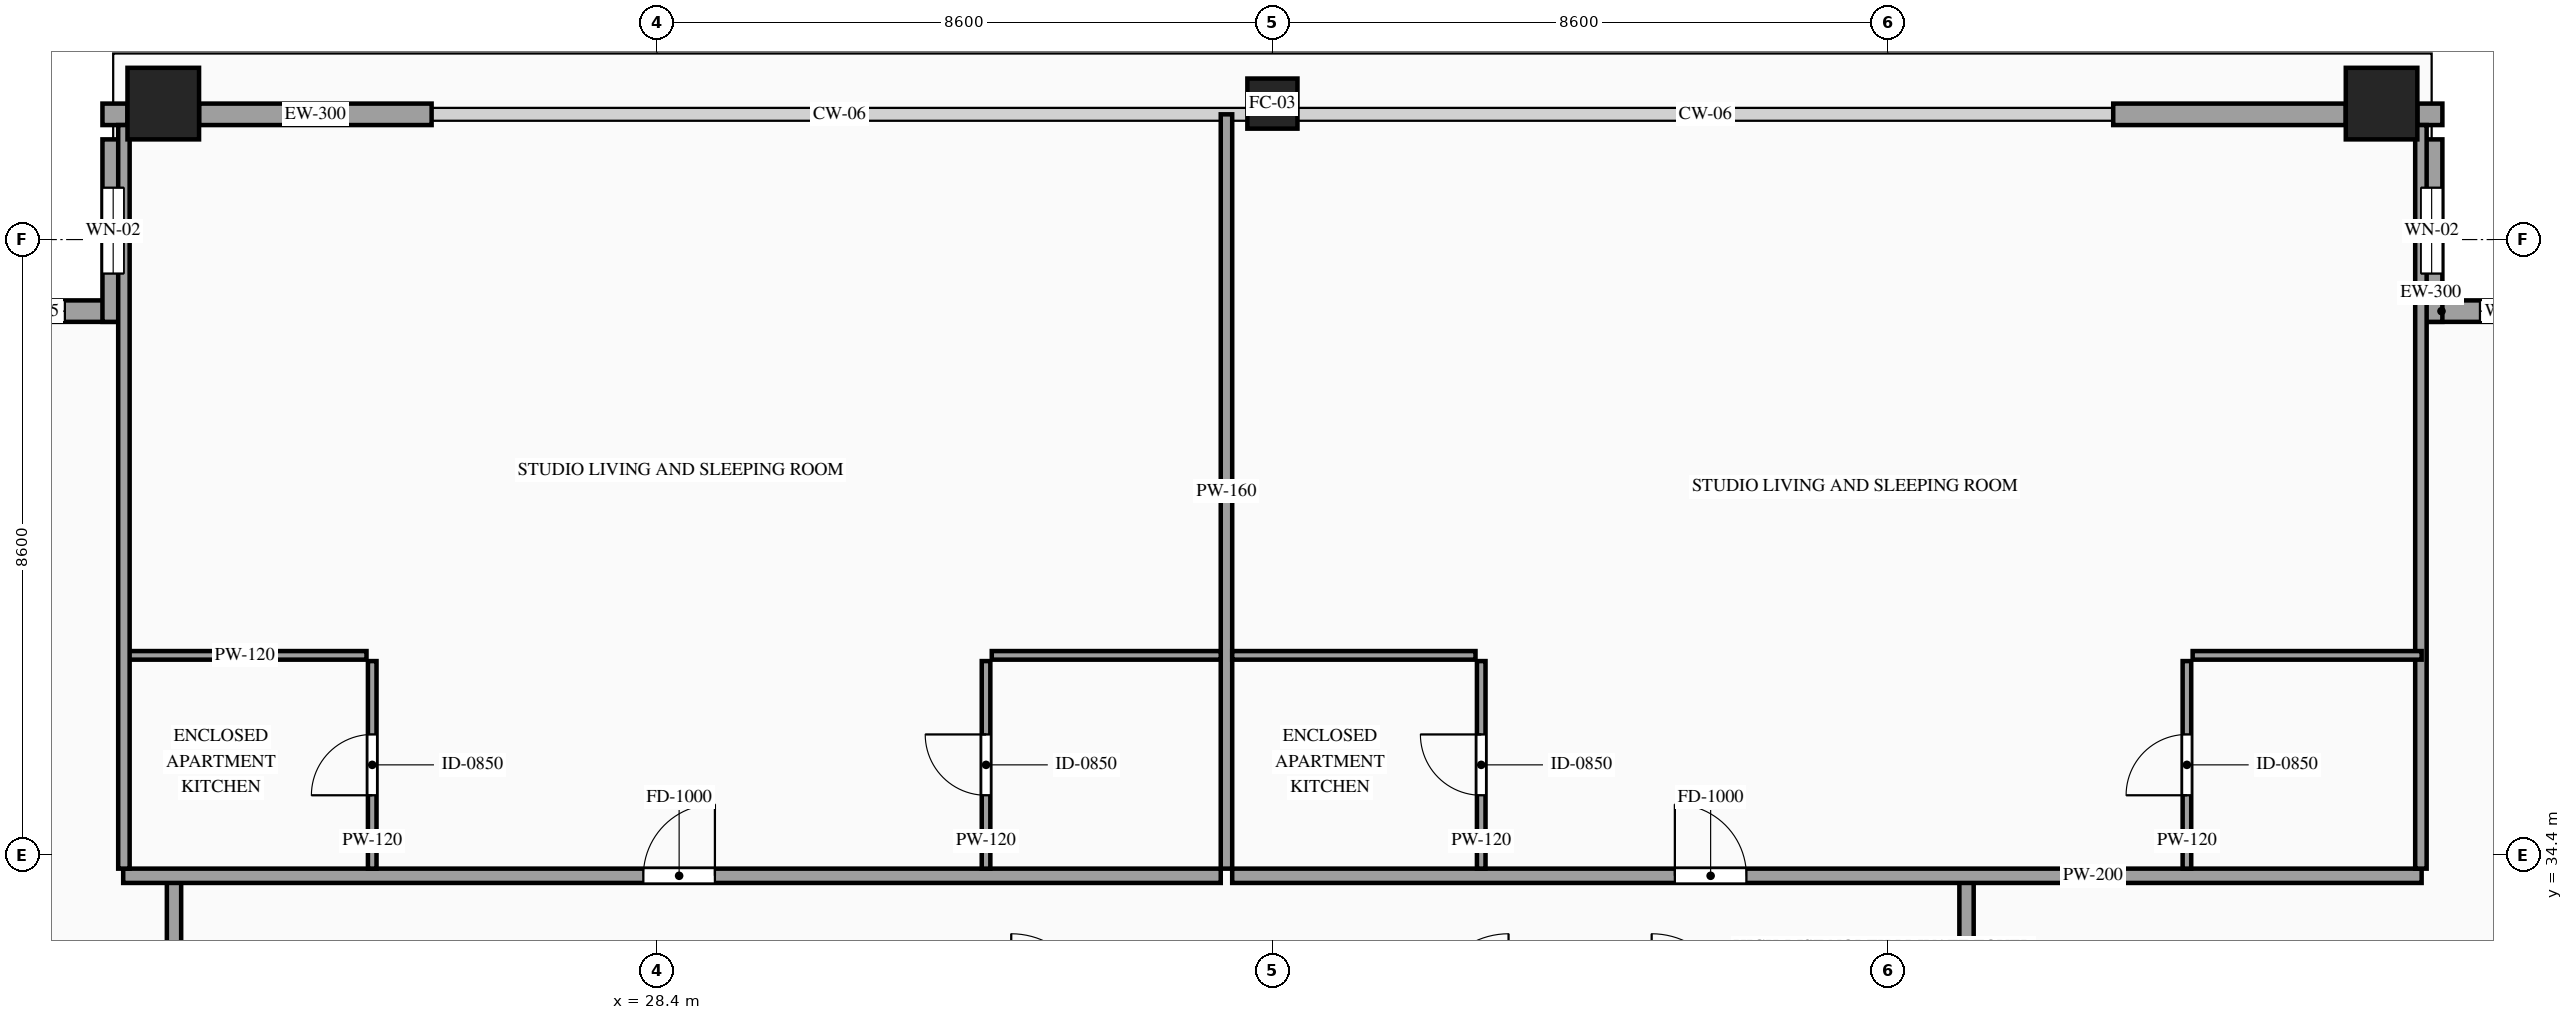
"""IFC4 building model, lengths in metres.
Left out: names, types, materials, properties, quantities, classifications, styles, units other than length and angle.
Written with IfcOpenShell. Run it as: python <this file> out.ifc"""

import sys

from ifc_helpers import new_model, si_unit, direction, frame, frame_2d, origin, origin_2d, place, context, subcontext, project, spatial, rectangle, hollow_rectangle, extrude, source, transform, mapped, element, fill, save


model = new_model("IFC4")
c1 = context("Model", 3, precision=1e-05, world=origin(), true_north=direction((0.0, 1.0)))
c2 = subcontext(c1, "Body", "Model", "MODEL_VIEW")
j1 = project(units=[si_unit("LENGTHUNIT", "METRE"), si_unit("PLANEANGLEUNIT", "RADIAN")], contexts=[c1])
p1 = place(None, origin())
s1 = spatial("IfcSite", under=j1, at=p1, CompositionType="ELEMENT")
p2 = place(p1, origin())
s2 = spatial("IfcBuilding", under=s1, at=p2, CompositionType="ELEMENT")
p3 = place(p2, frame((0.0, 0.0, 321.7)))
s3 = spatial("IfcBuildingStorey", under=s2, at=p3, CompositionType="ELEMENT", Elevation=321.7)
m1 = source(origin(), c2, "Body", "SweptSolid", [
    extrude(hollow_rectangle(XDim=1.0, YDim=1.0, WallThickness=0.048, at=origin_2d()), origin(), (0.0, 0.0, 1.0), 3.5),
])
p4 = place(p3, frame((21.5, 44.9, 0.0), z_axis=(0.0, 0.0, 1.0), x_axis=(1.0, 0.0, 0.0)))
e1 = element("IfcColumn", 1, at=p4, inside=s3, PredefinedType="COLUMN", context=c2, shape_type="MappedRepresentation", body=[
    mapped(m1, transform((0.0, 0.0, 0.0), scale=1.0)),
])
m2 = source(origin(), c2, "Body", "SweptSolid", [
    extrude(hollow_rectangle(XDim=0.7, YDim=0.7, WallThickness=0.032, at=origin_2d()), origin(), (0.0, 0.0, 1.0), 3.5),
])
p5 = place(p3, frame((37.0, 44.9, 0.0), z_axis=(0.0, 0.0, 1.0), x_axis=(1.0, 0.0, 0.0)))
e2 = element("IfcColumn", 2, at=p5, inside=s3, PredefinedType="COLUMN", context=c2, shape_type="MappedRepresentation", body=[
    mapped(m2, transform((0.0, 0.0, 0.0), scale=1.0)),
])
p6 = place(p3, frame((52.5, 44.9, 0.0), z_axis=(0.0, 0.0, 1.0), x_axis=(1.0, 0.0, 0.0)))
e3 = element("IfcColumn", 3, at=p6, inside=s3, PredefinedType="COLUMN", context=c2, shape_type="MappedRepresentation", body=[
    mapped(m1, transform((0.0, 0.0, 0.0), scale=1.0)),
])
p7 = place(p3, frame((20.95, 42.0, 0.0), z_axis=(0.0, 0.0, 1.0), x_axis=(-1.0, 0.0, 0.0)))
e4 = element("IfcWall", 4, at=p7, inside=s3, PredefinedType="SOLIDWALL", context=c2, shape_type="SweptSolid", body=[
    extrude(rectangle(XDim=2.55, YDim=0.3, at=frame_2d((1.275, 0.0))), origin(), (0.0, 0.0, 1.0), 3.28),
])
p8 = place(p7, frame((0.825, 0.0, 0.85)))
e5 = element("IfcOpeningElement", 5, at=p8, cuts=e4, PredefinedType="OPENING", context=c2, shape_type="SweptSolid", body=[
    extrude(rectangle(XDim=0.9, YDim=1.5, at=frame_2d((0.45, 0.75))), frame((0.0, 0.165, 0.0), z_axis=(0.0, -1.0, 0.0), x_axis=(1.0, 0.0, 0.0)), (0.0, 0.0, 1.0), 0.33),
])
p9 = place(p3, frame((20.8, 44.4, 0.0), z_axis=(0.0, 0.0, 1.0), x_axis=(0.0, -1.0, 0.0)))
e6 = element("IfcWall", 6, at=p9, inside=s3, PredefinedType="SOLIDWALL", context=c2, shape_type="SweptSolid", body=[
    extrude(rectangle(XDim=2.55, YDim=0.3, at=frame_2d((1.275, 0.0))), origin(), (0.0, 0.0, 1.0), 3.28),
])
p10 = place(p9, frame((0.675, 0.0, 0.85)))
e7 = element("IfcOpeningElement", 7, at=p10, cuts=e6, PredefinedType="OPENING", context=c2, shape_type="SweptSolid", body=[
    extrude(rectangle(XDim=1.2, YDim=2.1, at=frame_2d((0.6, 1.05))), frame((0.0, 0.165, 0.0), z_axis=(0.0, -1.0, 0.0), x_axis=(1.0, 0.0, 0.0)), (0.0, 0.0, 1.0), 0.33),
])
p11 = place(p3, frame((55.6, 42.0, 0.0), z_axis=(0.0, 0.0, 1.0), x_axis=(-1.0, 0.0, 0.0)))
e8 = element("IfcWall", 8, at=p11, inside=s3, PredefinedType="SOLIDWALL", context=c2, shape_type="SweptSolid", body=[
    extrude(rectangle(XDim=2.55, YDim=0.3, at=frame_2d((1.275, 0.0))), origin(), (0.0, 0.0, 1.0), 3.28),
])
p12 = place(p11, frame((0.825, 0.0, 0.85)))
e9 = element("IfcOpeningElement", 9, at=p12, cuts=e8, PredefinedType="OPENING", context=c2, shape_type="SweptSolid", body=[
    extrude(rectangle(XDim=0.9, YDim=1.5, at=frame_2d((0.45, 0.75))), frame((0.0, 0.165, 0.0), z_axis=(0.0, -1.0, 0.0), x_axis=(1.0, 0.0, 0.0)), (0.0, 0.0, 1.0), 0.33),
])
p13 = place(p3, frame((53.2, 41.85, 0.0), z_axis=(0.0, 0.0, 1.0), x_axis=(0.0, 1.0, 0.0)))
e10 = element("IfcWall", 10, at=p13, inside=s3, PredefinedType="SOLIDWALL", context=c2, shape_type="SweptSolid", body=[
    extrude(rectangle(XDim=2.55, YDim=0.3, at=frame_2d((1.275, 0.0))), origin(), (0.0, 0.0, 1.0), 3.28),
])
p14 = place(p13, frame((0.675, 0.0, 0.85)))
e11 = element("IfcOpeningElement", 11, at=p14, cuts=e10, PredefinedType="OPENING", context=c2, shape_type="SweptSolid", body=[
    extrude(rectangle(XDim=1.2, YDim=2.1, at=frame_2d((0.6, 1.05))), frame((0.0, 0.165, 0.0), z_axis=(0.0, -1.0, 0.0), x_axis=(1.0, 0.0, 0.0)), (0.0, 0.0, 1.0), 0.33),
])
m3 = source(origin(), c2, "Body", "SweptSolid", [
    extrude(rectangle(XDim=0.35, YDim=0.3, at=frame_2d((0.175, 0.0))), origin(), (0.0, 0.0, 1.0), 3.28),
])
for number, where, z_axis, x_axis in (
    (12, (20.65, 44.75, 0.0), (0.0, 0.0, 1.0), (1.0, 0.0, 0.0)),
    (13, (53.0, 44.75, 0.0), (0.0, 0.0, 1.0), (1.0, 0.0, 0.0)),
):
    element("IfcWall", number, at=place(p3, frame(where, z_axis=z_axis, x_axis=x_axis)), inside=s3, PredefinedType="SOLIDWALL", context=c2, shape_type="MappedRepresentation", body=[
        mapped(m3, transform((0.0, 0.0, 0.0), scale=1.0)),
    ])
m4 = source(origin(), c2, "Body", "SweptSolid", [
    extrude(rectangle(XDim=3.25, YDim=0.3, at=frame_2d((1.625, 0.0))), origin(), (0.0, 0.0, 1.0), 2.885),
])
for number, where, z_axis, x_axis in (
    (14, (22.0, 44.75, 0.0), (0.0, 0.0, 1.0), (1.0, 0.0, 0.0)),
    (15, (48.75, 44.75, 0.0), (0.0, 0.0, 1.0), (1.0, 0.0, 0.0)),
):
    element("IfcWall", number, at=place(p3, frame(where, z_axis=z_axis, x_axis=x_axis)), inside=s3, PredefinedType="SOLIDWALL", context=c2, shape_type="MappedRepresentation", body=[
        mapped(m4, transform((0.0, 0.0, 0.0), scale=1.0)),
    ])
m5 = source(origin(), c2, "Body", "SweptSolid", [
    extrude(rectangle(XDim=1.7, YDim=0.2, at=frame_2d((0.85, 0.0))), origin(), (0.0, 0.0, 1.0), 3.28),
])
for number, where, z_axis, x_axis in (
    (16, (21.65, 32.35, 0.0), (0.0, 0.0, 1.0), (0.0, 1.0, 0.0)),
    (17, (46.7, 32.35, 0.0), (0.0, 0.0, 1.0), (0.0, 1.0, 0.0)),
):
    element("IfcWall", number, at=place(p3, frame(where, z_axis=z_axis, x_axis=x_axis)), inside=s3, PredefinedType="PARTITIONING", context=c2, shape_type="MappedRepresentation", body=[
        mapped(m5, transform((0.0, 0.0, 0.0), scale=1.0)),
    ])
p15 = place(p3, frame((20.94, 34.11, 0.0), z_axis=(0.0, 0.0, 1.0), x_axis=(1.0, 0.0, 0.0)))
e18 = element("IfcWall", 18, at=p15, inside=s3, PredefinedType="PARTITIONING", context=c2, shape_type="SweptSolid", body=[
    extrude(rectangle(XDim=15.338, YDim=0.2, at=frame_2d((7.669, 0.0))), origin(), (0.0, 0.0, 1.0), 3.28),
])
p16 = place(p15, frame((7.269, 0.0, 0.0)))
e19 = element("IfcOpeningElement", 19, at=p16, cuts=e18, PredefinedType="OPENING", context=c2, shape_type="SweptSolid", body=[
    extrude(rectangle(XDim=1.0, YDim=2.2, at=frame_2d((0.5, 1.1))), frame((0.0, 0.115, 0.0), z_axis=(0.0, -1.0, 0.0), x_axis=(1.0, 0.0, 0.0)), (0.0, 0.0, 1.0), 0.23),
])
m6 = source(origin(), c2, "Body", "SweptSolid", [
    extrude(rectangle(XDim=10.54, YDim=0.16, at=frame_2d((5.27, 0.0))), origin(), (0.0, 0.0, 1.0), 3.28),
])
p17 = place(p3, frame((36.358, 34.21, 0.0), z_axis=(0.0, 0.0, 1.0), x_axis=(0.0, 1.0, 0.0)))
e20 = element("IfcWall", 20, at=p17, inside=s3, PredefinedType="PARTITIONING", context=c2, shape_type="MappedRepresentation", body=[
    mapped(m6, transform((0.0, 0.0, 0.0), scale=1.0)),
])
m7 = source(origin(), c2, "Body", "SweptSolid", [
    extrude(rectangle(XDim=3.4, YDim=0.12, at=frame_2d((1.7, 0.0))), origin(), (0.0, 0.0, 1.0), 3.28),
])
p18 = place(p3, frame((20.94, 37.19, 0.0), z_axis=(0.0, 0.0, 1.0), x_axis=(1.0, 0.0, 0.0)))
e21 = element("IfcWall", 21, at=p18, inside=s3, PredefinedType="PARTITIONING", context=c2, shape_type="MappedRepresentation", body=[
    mapped(m7, transform((0.0, 0.0, 0.0), scale=1.0)),
])
p19 = place(p3, frame((24.42, 34.21, 0.0), z_axis=(0.0, 0.0, 1.0), x_axis=(0.0, 1.0, 0.0)))
e22 = element("IfcWall", 22, at=p19, inside=s3, PredefinedType="PARTITIONING", context=c2, shape_type="SweptSolid", body=[
    extrude(rectangle(XDim=2.9, YDim=0.12, at=frame_2d((1.45, 0.0))), origin(), (0.0, 0.0, 1.0), 3.28),
])
p20 = place(p19, frame((1.025, 0.0, 0.0)))
e23 = element("IfcOpeningElement", 23, at=p20, cuts=e22, PredefinedType="OPENING", context=c2, shape_type="SweptSolid", body=[
    extrude(rectangle(XDim=0.85, YDim=2.1, at=frame_2d((0.425, 1.05))), frame((0.0, 0.075, 0.0), z_axis=(0.0, -1.0, 0.0), x_axis=(1.0, 0.0, 0.0)), (0.0, 0.0, 1.0), 0.15),
])
m8 = source(origin(), c2, "Body", "SweptSolid", [
    extrude(rectangle(XDim=3.2, YDim=0.12, at=frame_2d((1.6, 0.0))), origin(), (0.0, 0.0, 1.0), 3.28),
])
p21 = place(p3, frame((33.078, 37.19, 0.0), z_axis=(0.0, 0.0, 1.0), x_axis=(1.0, 0.0, 0.0)))
e24 = element("IfcWall", 24, at=p21, inside=s3, PredefinedType="PARTITIONING", context=c2, shape_type="MappedRepresentation", body=[
    mapped(m8, transform((0.0, 0.0, 0.0), scale=1.0)),
])
p22 = place(p3, frame((32.998, 34.21, 0.0), z_axis=(0.0, 0.0, 1.0), x_axis=(0.0, 1.0, 0.0)))
e25 = element("IfcWall", 25, at=p22, inside=s3, PredefinedType="PARTITIONING", context=c2, shape_type="SweptSolid", body=[
    extrude(rectangle(XDim=2.9, YDim=0.12, at=frame_2d((1.45, 0.0))), origin(), (0.0, 0.0, 1.0), 3.28),
])
p23 = place(p22, frame((1.025, 0.0, 0.0)))
e26 = element("IfcOpeningElement", 26, at=p23, cuts=e25, PredefinedType="OPENING", context=c2, shape_type="SweptSolid", body=[
    extrude(rectangle(XDim=0.85, YDim=2.1, at=frame_2d((0.425, 1.05))), frame((0.0, 0.075, 0.0), z_axis=(0.0, -1.0, 0.0), x_axis=(1.0, 0.0, 0.0)), (0.0, 0.0, 1.0), 0.15),
])
p24 = place(p3, frame((36.438, 34.11, 0.0), z_axis=(0.0, 0.0, 1.0), x_axis=(1.0, 0.0, 0.0)))
e27 = element("IfcWall", 27, at=p24, inside=s3, PredefinedType="PARTITIONING", context=c2, shape_type="SweptSolid", body=[
    extrude(rectangle(XDim=16.622, YDim=0.2, at=frame_2d((8.311, 0.0))), origin(), (0.0, 0.0, 1.0), 3.28),
])
p25 = place(p24, frame((6.186, 0.0, 0.0)))
e28 = element("IfcOpeningElement", 28, at=p25, cuts=e27, PredefinedType="OPENING", context=c2, shape_type="SweptSolid", body=[
    extrude(rectangle(XDim=1.0, YDim=2.2, at=frame_2d((0.5, 1.1))), frame((0.0, 0.115, 0.0), z_axis=(0.0, -1.0, 0.0), x_axis=(1.0, 0.0, 0.0)), (0.0, 0.0, 1.0), 0.23),
])
m9 = source(origin(), c2, "Body", "SweptSolid", [
    extrude(rectangle(XDim=10.39, YDim=0.16, at=frame_2d((5.195, 0.0))), origin(), (0.0, 0.0, 1.0), 3.28),
])
for number, where, z_axis, x_axis in (
    (29, (20.95, 34.21, 0.0), (0.0, 0.0, 1.0), (0.0, 1.0, 0.0)),
    (30, (53.05, 34.21, 0.0), (0.0, 0.0, 1.0), (0.0, 1.0, 0.0)),
):
    element("IfcWall", number, at=place(p3, frame(where, z_axis=z_axis, x_axis=x_axis)), inside=s3, PredefinedType="PARTITIONING", context=c2, shape_type="MappedRepresentation", body=[
        mapped(m9, transform((0.0, 0.0, 0.0), scale=1.0)),
    ])
m10 = source(origin(), c2, "Body", "SweptSolid", [
    extrude(rectangle(XDim=3.4, YDim=0.12, at=frame_2d((1.7, 0.0))), origin(), (0.0, 0.0, 1.0), 3.28),
])
p26 = place(p3, frame((36.438, 37.19, 0.0), z_axis=(0.0, 0.0, 1.0), x_axis=(1.0, 0.0, 0.0)))
e31 = element("IfcWall", 31, at=p26, inside=s3, PredefinedType="PARTITIONING", context=c2, shape_type="MappedRepresentation", body=[
    mapped(m10, transform((0.0, 0.0, 0.0), scale=1.0)),
])
p27 = place(p3, frame((39.918, 34.21, 0.0), z_axis=(0.0, 0.0, 1.0), x_axis=(0.0, 1.0, 0.0)))
e32 = element("IfcWall", 32, at=p27, inside=s3, PredefinedType="PARTITIONING", context=c2, shape_type="SweptSolid", body=[
    extrude(rectangle(XDim=2.9, YDim=0.12, at=frame_2d((1.45, 0.0))), origin(), (0.0, 0.0, 1.0), 3.28),
])
p28 = place(p27, frame((1.025, 0.0, 0.0)))
e33 = element("IfcOpeningElement", 33, at=p28, cuts=e32, PredefinedType="OPENING", context=c2, shape_type="SweptSolid", body=[
    extrude(rectangle(XDim=0.85, YDim=2.1, at=frame_2d((0.425, 1.05))), frame((0.0, 0.075, 0.0), z_axis=(0.0, -1.0, 0.0), x_axis=(1.0, 0.0, 0.0)), (0.0, 0.0, 1.0), 0.15),
])
m11 = source(origin(), c2, "Body", "SweptSolid", [
    extrude(rectangle(XDim=3.2, YDim=0.12, at=frame_2d((1.6, 0.0))), origin(), (0.0, 0.0, 1.0), 3.28),
])
p29 = place(p3, frame((49.86, 37.19, 0.0), z_axis=(0.0, 0.0, 1.0), x_axis=(1.0, 0.0, 0.0)))
e34 = element("IfcWall", 34, at=p29, inside=s3, PredefinedType="PARTITIONING", context=c2, shape_type="MappedRepresentation", body=[
    mapped(m11, transform((0.0, 0.0, 0.0), scale=1.0)),
])
p30 = place(p3, frame((49.78, 34.21, 0.0), z_axis=(0.0, 0.0, 1.0), x_axis=(0.0, 1.0, 0.0)))
e35 = element("IfcWall", 35, at=p30, inside=s3, PredefinedType="PARTITIONING", context=c2, shape_type="SweptSolid", body=[
    extrude(rectangle(XDim=2.9, YDim=0.12, at=frame_2d((1.45, 0.0))), origin(), (0.0, 0.0, 1.0), 3.28),
])
p31 = place(p30, frame((1.025, 0.0, 0.0)))
e36 = element("IfcOpeningElement", 36, at=p31, cuts=e35, PredefinedType="OPENING", context=c2, shape_type="SweptSolid", body=[
    extrude(rectangle(XDim=0.85, YDim=2.1, at=frame_2d((0.425, 1.05))), frame((0.0, 0.075, 0.0), z_axis=(0.0, -1.0, 0.0), x_axis=(1.0, 0.0, 0.0)), (0.0, 0.0, 1.0), 0.15),
])
m12 = source(origin(), c2, "Body", "SweptSolid", [
    extrude(rectangle(XDim=0.9, YDim=1.5, at=frame_2d((0.45, 0.75))), frame((0.0, 0.03, 0.0), z_axis=(0.0, -1.0, 0.0), x_axis=(1.0, 0.0, 0.0)), (0.0, 0.0, 1.0), 0.06),
])
p32 = place(p8, origin())
e37 = element("IfcWindow", 37, at=p32, inside=s3, PartitioningType="SINGLE_PANEL", PredefinedType="WINDOW", context=c2, shape_type="MappedRepresentation", body=[
    mapped(m12, transform((0.0, 0.0, 0.0), scale=1.0)),
])
fill(e5, e37)
m13 = source(origin(), c2, "Body", "SweptSolid", [
    extrude(rectangle(XDim=1.2, YDim=2.1, at=frame_2d((0.6, 1.05))), frame((0.0, 0.03, 0.0), z_axis=(0.0, -1.0, 0.0), x_axis=(1.0, 0.0, 0.0)), (0.0, 0.0, 1.0), 0.06),
])
p33 = place(p10, origin())
e38 = element("IfcWindow", 38, at=p33, inside=s3, PartitioningType="SINGLE_PANEL", PredefinedType="WINDOW", context=c2, shape_type="MappedRepresentation", body=[
    mapped(m13, transform((0.0, 0.0, 0.0), scale=1.0)),
])
fill(e7, e38)
p34 = place(p12, origin())
e39 = element("IfcWindow", 39, at=p34, inside=s3, PartitioningType="SINGLE_PANEL", PredefinedType="WINDOW", context=c2, shape_type="MappedRepresentation", body=[
    mapped(m12, transform((0.0, 0.0, 0.0), scale=1.0)),
])
fill(e9, e39)
p35 = place(p14, origin())
e40 = element("IfcWindow", 40, at=p35, inside=s3, PartitioningType="SINGLE_PANEL", PredefinedType="WINDOW", context=c2, shape_type="MappedRepresentation", body=[
    mapped(m13, transform((0.0, 0.0, 0.0), scale=1.0)),
])
fill(e11, e40)
m14 = source(origin(), c2, "Body", "SweptSolid", [
    extrude(rectangle(XDim=1.0, YDim=2.2, at=frame_2d((0.5, 1.1))), frame((0.0, 0.025, 0.0), z_axis=(0.0, -1.0, 0.0), x_axis=(1.0, 0.0, 0.0)), (0.0, 0.0, 1.0), 0.05),
])
p36 = place(p16, origin())
e41 = element("IfcDoor", 41, at=p36, inside=s3, OperationType="SINGLE_SWING_RIGHT", PredefinedType="DOOR", context=c2, shape_type="MappedRepresentation", body=[
    mapped(m14, transform((0.0, 0.0, 0.0), scale=1.0)),
])
fill(e19, e41)
m15 = source(origin(), c2, "Body", "SweptSolid", [
    extrude(rectangle(XDim=0.85, YDim=2.1, at=frame_2d((0.425, 1.05))), frame((0.0, 0.025, 0.0), z_axis=(0.0, -1.0, 0.0), x_axis=(1.0, 0.0, 0.0)), (0.0, 0.0, 1.0), 0.05),
])
p37 = place(p20, origin())
e42 = element("IfcDoor", 42, at=p37, inside=s3, OperationType="SINGLE_SWING_LEFT", PredefinedType="DOOR", context=c2, shape_type="MappedRepresentation", body=[
    mapped(m15, transform((0.0, 0.0, 0.0), scale=1.0)),
])
fill(e23, e42)
p38 = place(p23, origin())
e43 = element("IfcDoor", 43, at=p38, inside=s3, OperationType="SINGLE_SWING_RIGHT", PredefinedType="DOOR", context=c2, shape_type="MappedRepresentation", body=[
    mapped(m15, transform((0.0, 0.0, 0.0), scale=1.0)),
])
fill(e26, e43)
p39 = place(p25, origin())
e44 = element("IfcDoor", 44, at=p39, inside=s3, OperationType="SINGLE_SWING_LEFT", PredefinedType="DOOR", context=c2, shape_type="MappedRepresentation", body=[
    mapped(m14, transform((0.0, 0.0, 0.0), scale=1.0)),
])
fill(e28, e44)
p40 = place(p28, origin())
e45 = element("IfcDoor", 45, at=p40, inside=s3, OperationType="SINGLE_SWING_RIGHT", PredefinedType="DOOR", context=c2, shape_type="MappedRepresentation", body=[
    mapped(m15, transform((0.0, 0.0, 0.0), scale=1.0)),
])
fill(e33, e45)
p41 = place(p31, origin())
e46 = element("IfcDoor", 46, at=p41, inside=s3, OperationType="SINGLE_SWING_LEFT", PredefinedType="DOOR", context=c2, shape_type="MappedRepresentation", body=[
    mapped(m15, transform((0.0, 0.0, 0.0), scale=1.0)),
])
fill(e36, e46)
save(model, sys.argv[1])
